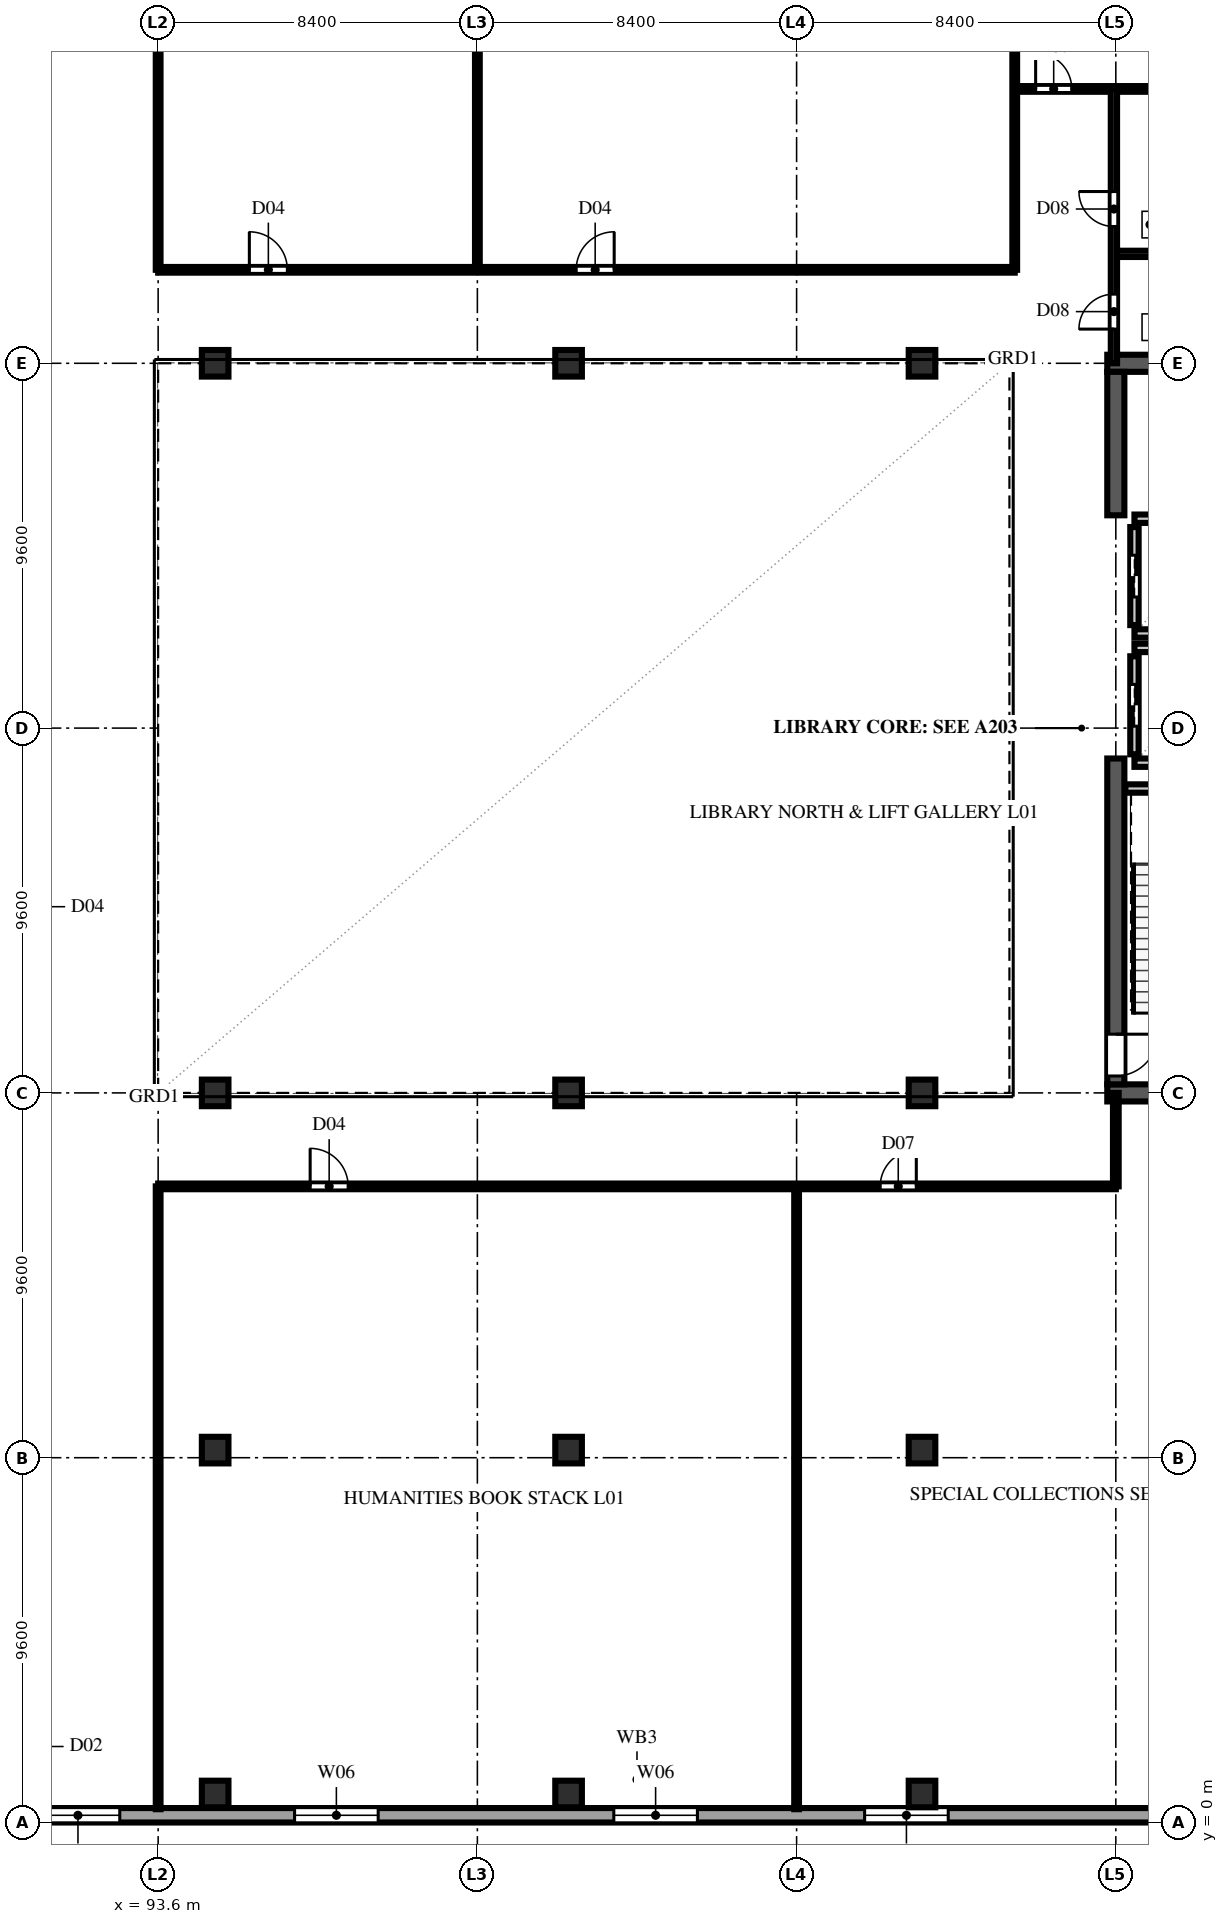
"""IFC4 building model, lengths in metres.
Left out: names, types, materials, properties, quantities, classifications, styles, units other than length and angle.
Written with IfcOpenShell. Run it as: python <this file> out.ifc"""

import sys

from ifc_helpers import new_model, si_unit, direction, frame, frame_2d, origin, origin_2d, place, context, subcontext, project, spatial, rectangle, extrude, element, fill, save


model = new_model("IFC4")
c1 = context("Model", 3, precision=1e-05, world=origin(), true_north=direction((0.0, 1.0)))
c2 = subcontext(c1, "Body", "Model", "MODEL_VIEW")
j1 = project(units=[si_unit("LENGTHUNIT", "METRE"), si_unit("PLANEANGLEUNIT", "RADIAN")], contexts=[c1])
p1 = place(None, origin())
s1 = spatial("IfcSite", under=j1, at=p1, CompositionType="ELEMENT")
p2 = place(p1, origin())
s2 = spatial("IfcBuilding", under=s1, at=p2, CompositionType="ELEMENT")
p3 = place(p2, frame((0.0, 0.0, 5.2)))
s3 = spatial("IfcBuildingStorey", under=s2, at=p3, CompositionType="ELEMENT", Elevation=5.2)
for number, where, z_axis, x_axis in (
    (1, (118.575, 19.2, 0.0), (0.0, 0.0, 1.0), (1.0, 0.0, 0.0)),
    (2, (118.575, 38.4, 0.0), (0.0, 0.0, 1.0), (1.0, 0.0, 0.0)),
):
    element("IfcWall", number, at=place(p3, frame(where, z_axis=z_axis, x_axis=x_axis)), inside=s3, PredefinedType="SHEAR", context=c2, shape_type="SweptSolid", body=[
        extrude(rectangle(XDim=7.2, YDim=0.45, at=frame_2d((3.6, 0.0))), origin(), (0.0, 0.0, 1.0), 4.85),
    ])
p4 = place(p3, frame((118.8, 19.425, 0.0), z_axis=(0.0, 0.0, 1.0), x_axis=(0.0, 1.0, 0.0)))
e3 = element("IfcWall", 3, at=p4, inside=s3, PredefinedType="SHEAR", context=c2, shape_type="SweptSolid", body=[
    extrude(rectangle(XDim=8.575, YDim=0.45, at=frame_2d((4.288, 0.0))), origin(), (0.0, 0.0, 1.0), 4.85),
])
p5 = place(p4, frame((0.22, 0.0, 0.0)))
e4 = element("IfcOpeningElement", 4, at=p5, cuts=e3, PredefinedType="OPENING", context=c2, shape_type="SweptSolid", body=[
    extrude(rectangle(XDim=1.1, YDim=2.2, at=frame_2d((0.55, 1.1))), frame((0.0, 0.237, 0.0), z_axis=(0.0, -1.0, 0.0), x_axis=(1.0, 0.0, 0.0)), (0.0, 0.0, 1.0), 0.474),
])
p6 = place(p3, frame((118.8, 34.4, 0.0), z_axis=(0.0, 0.0, 1.0), x_axis=(0.0, 1.0, 0.0)))
e5 = element("IfcWall", 5, at=p6, inside=s3, PredefinedType="SHEAR", context=c2, shape_type="SweptSolid", body=[
    extrude(rectangle(XDim=3.775, YDim=0.45, at=frame_2d((1.888, 0.0))), origin(), (0.0, 0.0, 1.0), 4.85),
])
for number, where, z_axis, x_axis in (
    (6, (95.1, 0.75, 0.0), (0.0, 0.0, 1.0), (1.0, 0.0, 0.0)),
    (7, (95.1, 9.8, 0.0), (0.0, 0.0, 1.0), (1.0, 0.0, 0.0)),
    (8, (95.1, 19.2, 0.0), (0.0, 0.0, 1.0), (1.0, 0.0, 0.0)),
    (9, (95.1, 38.4, 0.0), (0.0, 0.0, 1.0), (1.0, 0.0, 0.0)),
    (10, (104.4, 0.75, 0.0), (0.0, 0.0, 1.0), (1.0, 0.0, 0.0)),
    (11, (104.4, 9.8, 0.0), (0.0, 0.0, 1.0), (1.0, 0.0, 0.0)),
    (12, (104.4, 19.2, 0.0), (0.0, 0.0, 1.0), (1.0, 0.0, 0.0)),
    (13, (104.4, 38.4, 0.0), (0.0, 0.0, 1.0), (1.0, 0.0, 0.0)),
    (14, (113.7, 0.75, 0.0), (0.0, 0.0, 1.0), (1.0, 0.0, 0.0)),
    (15, (113.7, 9.8, 0.0), (0.0, 0.0, 1.0), (1.0, 0.0, 0.0)),
    (16, (113.7, 19.2, 0.0), (0.0, 0.0, 1.0), (1.0, 0.0, 0.0)),
    (17, (113.7, 38.4, 0.0), (0.0, 0.0, 1.0), (1.0, 0.0, 0.0)),
):
    element("IfcColumn", number, at=place(p3, frame(where, z_axis=z_axis, x_axis=x_axis)), inside=s3, PredefinedType="COLUMN", context=c2, shape_type="SweptSolid", body=[
        extrude(rectangle(XDim=0.7, YDim=0.7, at=origin_2d()), origin(), (0.0, 0.0, 1.0), 5.2),
    ])
p7 = place(p3, frame((85.39, 0.19, 0.0), z_axis=(0.0, 0.0, 1.0), x_axis=(1.0, 0.0, 0.0)))
e18 = element("IfcWall", 18, at=p7, inside=s3, PredefinedType="SOLIDWALL", context=c2, shape_type="SweptSolid", body=[
    extrude(rectangle(XDim=41.62, YDim=0.38, at=frame_2d((20.81, 0.0))), origin(), (0.0, 0.0, 1.0), 4.85),
])
p8 = place(p7, frame((5.0, 0.0, 0.85)))
e19 = element("IfcOpeningElement", 19, at=p8, cuts=e18, PredefinedType="OPENING", context=c2, shape_type="SweptSolid", body=[
    extrude(rectangle(XDim=2.2, YDim=2.25, at=frame_2d((1.1, 1.125))), frame((0.0, 0.202, 0.0), z_axis=(0.0, -1.0, 0.0), x_axis=(1.0, 0.0, 0.0)), (0.0, 0.0, 1.0), 0.404),
])
p9 = place(p7, frame((11.8, 0.0, 0.85)))
e20 = element("IfcOpeningElement", 20, at=p9, cuts=e18, PredefinedType="OPENING", context=c2, shape_type="SweptSolid", body=[
    extrude(rectangle(XDim=2.2, YDim=2.25, at=frame_2d((1.1, 1.125))), frame((0.0, 0.202, 0.0), z_axis=(0.0, -1.0, 0.0), x_axis=(1.0, 0.0, 0.0)), (0.0, 0.0, 1.0), 0.404),
])
p10 = place(p7, frame((20.2, 0.0, 0.85)))
e21 = element("IfcOpeningElement", 21, at=p10, cuts=e18, PredefinedType="OPENING", context=c2, shape_type="SweptSolid", body=[
    extrude(rectangle(XDim=2.2, YDim=2.25, at=frame_2d((1.1, 1.125))), frame((0.0, 0.202, 0.0), z_axis=(0.0, -1.0, 0.0), x_axis=(1.0, 0.0, 0.0)), (0.0, 0.0, 1.0), 0.404),
])
p11 = place(p7, frame((26.8, 0.0, 0.85)))
e22 = element("IfcOpeningElement", 22, at=p11, cuts=e18, PredefinedType="OPENING", context=c2, shape_type="SweptSolid", body=[
    extrude(rectangle(XDim=2.2, YDim=2.25, at=frame_2d((1.1, 1.125))), frame((0.0, 0.202, 0.0), z_axis=(0.0, -1.0, 0.0), x_axis=(1.0, 0.0, 0.0)), (0.0, 0.0, 1.0), 0.404),
])
p12 = place(p7, frame((36.8, 0.0, 0.85)))
e23 = element("IfcOpeningElement", 23, at=p12, cuts=e18, PredefinedType="OPENING", context=c2, shape_type="SweptSolid", body=[
    extrude(rectangle(XDim=2.2, YDim=2.25, at=frame_2d((1.1, 1.125))), frame((0.0, 0.202, 0.0), z_axis=(0.0, -1.0, 0.0), x_axis=(1.0, 0.0, 0.0)), (0.0, 0.0, 1.0), 0.404),
])
p13 = place(p3, frame((119.05, 27.21, 0.0), z_axis=(0.0, 0.0, 1.0), x_axis=(1.0, 0.0, 0.0)))
e24 = element("IfcWall", 24, at=p13, inside=s3, PredefinedType="SOLIDWALL", context=c2, shape_type="SweptSolid", body=[
    extrude(rectangle(XDim=3.75, YDim=0.22, at=frame_2d((1.875, 0.0))), origin(), (0.0, 0.0, 1.0), 4.85),
])
p14 = place(p3, frame((119.29, 28.11, 0.0), z_axis=(0.0, 0.0, 1.0), x_axis=(0.0, 1.0, 0.0)))
e25 = element("IfcWall", 25, at=p14, inside=s3, PredefinedType="SOLIDWALL", context=c2, shape_type="SweptSolid", body=[
    extrude(rectangle(XDim=2.58, YDim=0.22, at=frame_2d((1.29, 0.0))), origin(), (0.0, 0.0, 1.0), 4.85),
])
p15 = place(p14, frame((0.74, 0.0, 0.0)))
e26 = element("IfcOpeningElement", 26, at=p15, cuts=e25, PredefinedType="OPENING", context=c2, shape_type="SweptSolid", body=[
    extrude(rectangle(XDim=1.1, YDim=2.2, at=frame_2d((0.55, 1.1))), frame((0.0, 0.122, 0.0), z_axis=(0.0, -1.0, 0.0), x_axis=(1.0, 0.0, 0.0)), (0.0, 0.0, 1.0), 0.244),
])
for number, where, z_axis, x_axis in (
    (27, (119.29, 27.89, 0.0), (0.0, 0.0, 1.0), (1.0, 0.0, 0.0)),
    (28, (119.29, 30.91, 0.0), (0.0, 0.0, 1.0), (1.0, 0.0, 0.0)),
):
    element("IfcWall", number, at=place(p3, frame(where, z_axis=z_axis, x_axis=x_axis)), inside=s3, PredefinedType="SOLIDWALL", context=c2, shape_type="SweptSolid", body=[
        extrude(rectangle(XDim=2.62, YDim=0.22, at=frame_2d((1.31, 0.0))), origin(), (0.0, 0.0, 1.0), 4.85),
    ])
p16 = place(p3, frame((119.29, 31.51, 0.0), z_axis=(0.0, 0.0, 1.0), x_axis=(0.0, 1.0, 0.0)))
e29 = element("IfcWall", 29, at=p16, inside=s3, PredefinedType="SOLIDWALL", context=c2, shape_type="SweptSolid", body=[
    extrude(rectangle(XDim=2.58, YDim=0.22, at=frame_2d((1.29, 0.0))), origin(), (0.0, 0.0, 1.0), 4.85),
])
p17 = place(p16, frame((0.74, 0.0, 0.0)))
e30 = element("IfcOpeningElement", 30, at=p17, cuts=e29, PredefinedType="OPENING", context=c2, shape_type="SweptSolid", body=[
    extrude(rectangle(XDim=1.1, YDim=2.2, at=frame_2d((0.55, 1.1))), frame((0.0, 0.122, 0.0), z_axis=(0.0, -1.0, 0.0), x_axis=(1.0, 0.0, 0.0)), (0.0, 0.0, 1.0), 0.244),
])
for number, where, z_axis, x_axis in (
    (31, (119.29, 31.29, 0.0), (0.0, 0.0, 1.0), (1.0, 0.0, 0.0)),
    (32, (119.29, 34.31, 0.0), (0.0, 0.0, 1.0), (1.0, 0.0, 0.0)),
):
    element("IfcWall", number, at=place(p3, frame(where, z_axis=z_axis, x_axis=x_axis)), inside=s3, PredefinedType="SOLIDWALL", context=c2, shape_type="SweptSolid", body=[
        extrude(rectangle(XDim=2.62, YDim=0.22, at=frame_2d((1.31, 0.0))), origin(), (0.0, 0.0, 1.0), 4.85),
    ])
for number, where, z_axis, x_axis in (
    (33, (93.6, 0.35, 0.0), (0.0, 0.0, 1.0), (0.0, 1.0, 0.0)),
    (34, (110.4, 0.35, 0.0), (0.0, 0.0, 1.0), (0.0, 1.0, 0.0)),
):
    element("IfcWall", number, at=place(p3, frame(where, z_axis=z_axis, x_axis=x_axis)), inside=s3, PredefinedType="PARTITIONING", context=c2, shape_type="SweptSolid", body=[
        extrude(rectangle(XDim=16.39, YDim=0.125, at=frame_2d((8.195, 0.0))), origin(), (0.0, 0.0, 1.0), 4.85),
    ])
p18 = place(p3, frame((118.8, 16.74, 0.0), z_axis=(0.0, 0.0, 1.0), x_axis=(0.0, 1.0, 0.0)))
e35 = element("IfcWall", 35, at=p18, inside=s3, PredefinedType="PARTITIONING", context=c2, shape_type="SweptSolid", body=[
    extrude(rectangle(XDim=2.46, YDim=0.15, at=frame_2d((1.23, 0.0))), origin(), (0.0, 0.0, 1.0), 4.85),
])
p19 = place(p3, frame((93.6, 16.74, 0.0), z_axis=(0.0, 0.0, 1.0), x_axis=(1.0, 0.0, 0.0)))
e36 = element("IfcWall", 36, at=p19, inside=s3, PredefinedType="PARTITIONING", context=c2, shape_type="SweptSolid", body=[
    extrude(rectangle(XDim=25.2, YDim=0.15, at=frame_2d((12.6, 0.0))), origin(), (0.0, 0.0, 1.0), 4.85),
])
p20 = place(p19, frame((4.0, 0.0, 0.0)))
e37 = element("IfcOpeningElement", 37, at=p20, cuts=e36, PredefinedType="OPENING", context=c2, shape_type="SweptSolid", body=[
    extrude(rectangle(XDim=1.0, YDim=2.2, at=frame_2d((0.5, 1.1))), frame((0.0, 0.087, 0.0), z_axis=(0.0, -1.0, 0.0), x_axis=(1.0, 0.0, 0.0)), (0.0, 0.0, 1.0), 0.174),
])
p21 = place(p19, frame((19.0, 0.0, 0.0)))
e38 = element("IfcOpeningElement", 38, at=p21, cuts=e36, PredefinedType="OPENING", context=c2, shape_type="SweptSolid", body=[
    extrude(rectangle(XDim=0.95, YDim=2.15, at=frame_2d((0.475, 1.075))), frame((0.0, 0.087, 0.0), z_axis=(0.0, -1.0, 0.0), x_axis=(1.0, 0.0, 0.0)), (0.0, 0.0, 1.0), 0.174),
])
for number, where, z_axis, x_axis in (
    (39, (93.6, 40.86, 0.0), (0.0, 0.0, 1.0), (0.0, 1.0, 0.0)),
    (40, (102.0, 40.86, 0.0), (0.0, 0.0, 1.0), (0.0, 1.0, 0.0)),
    (41, (116.14, 40.86, 0.0), (0.0, 0.0, 1.0), (0.0, 1.0, 0.0)),
):
    element("IfcWall", number, at=place(p3, frame(where, z_axis=z_axis, x_axis=x_axis)), inside=s3, PredefinedType="PARTITIONING", context=c2, shape_type="SweptSolid", body=[
        extrude(rectangle(XDim=16.39, YDim=0.125, at=frame_2d((8.195, 0.0))), origin(), (0.0, 0.0, 1.0), 4.85),
    ])
p22 = place(p3, frame((93.6, 40.86, 0.0), z_axis=(0.0, 0.0, 1.0), x_axis=(1.0, 0.0, 0.0)))
e42 = element("IfcWall", 42, at=p22, inside=s3, PredefinedType="PARTITIONING", context=c2, shape_type="SweptSolid", body=[
    extrude(rectangle(XDim=22.54, YDim=0.15, at=frame_2d((11.27, 0.0))), origin(), (0.0, 0.0, 1.0), 4.85),
])
p23 = place(p22, frame((2.4, 0.0, 0.0)))
e43 = element("IfcOpeningElement", 43, at=p23, cuts=e42, PredefinedType="OPENING", context=c2, shape_type="SweptSolid", body=[
    extrude(rectangle(XDim=1.0, YDim=2.2, at=frame_2d((0.5, 1.1))), frame((0.0, 0.087, 0.0), z_axis=(0.0, -1.0, 0.0), x_axis=(1.0, 0.0, 0.0)), (0.0, 0.0, 1.0), 0.174),
])
p24 = place(p22, frame((11.0, 0.0, 0.0)))
e44 = element("IfcOpeningElement", 44, at=p24, cuts=e42, PredefinedType="OPENING", context=c2, shape_type="SweptSolid", body=[
    extrude(rectangle(XDim=1.0, YDim=2.2, at=frame_2d((0.5, 1.1))), frame((0.0, 0.087, 0.0), z_axis=(0.0, -1.0, 0.0), x_axis=(1.0, 0.0, 0.0)), (0.0, 0.0, 1.0), 0.174),
])
p25 = place(p3, frame((118.75, 41.28, 0.0), z_axis=(0.0, 0.0, 1.0), x_axis=(1.0, 0.0, 0.0)))
e45 = element("IfcWall", 45, at=p25, inside=s3, PredefinedType="PLUMBINGWALL", context=c2, shape_type="SweptSolid", body=[
    extrude(rectangle(XDim=8.1, YDim=0.165, at=frame_2d((4.05, 0.0))), origin(), (0.0, 0.0, 1.0), 4.85),
])
p26 = place(p3, frame((116.14, 45.62, 0.0), z_axis=(0.0, 0.0, 1.0), x_axis=(1.0, 0.0, 0.0)))
e46 = element("IfcWall", 46, at=p26, inside=s3, PredefinedType="PARTITIONING", context=c2, shape_type="SweptSolid", body=[
    extrude(rectangle(XDim=10.71, YDim=0.15, at=frame_2d((5.355, 0.0))), origin(), (0.0, 0.0, 1.0), 4.85),
])
p27 = place(p26, frame((0.55, 0.0, 0.0)))
e47 = element("IfcOpeningElement", 47, at=p27, cuts=e46, PredefinedType="OPENING", context=c2, shape_type="SweptSolid", body=[
    extrude(rectangle(XDim=0.95, YDim=2.15, at=frame_2d((0.475, 1.075))), frame((0.0, 0.087, 0.0), z_axis=(0.0, -1.0, 0.0), x_axis=(1.0, 0.0, 0.0)), (0.0, 0.0, 1.0), 0.174),
])
p28 = place(p3, frame((118.75, 38.4, 0.0), z_axis=(0.0, 0.0, 1.0), x_axis=(0.0, 1.0, 0.0)))
e48 = element("IfcWall", 48, at=p28, inside=s3, PredefinedType="PLUMBINGWALL", context=c2, shape_type="SweptSolid", body=[
    extrude(rectangle(XDim=7.22, YDim=0.165, at=frame_2d((3.61, 0.0))), origin(), (0.0, 0.0, 1.0), 4.85),
])
p29 = place(p28, frame((0.9, 0.0, 0.0)))
e49 = element("IfcOpeningElement", 49, at=p29, cuts=e48, PredefinedType="OPENING", context=c2, shape_type="SweptSolid", body=[
    extrude(rectangle(XDim=0.92, YDim=2.15, at=frame_2d((0.46, 1.075))), frame((0.0, 0.094, 0.0), z_axis=(0.0, -1.0, 0.0), x_axis=(1.0, 0.0, 0.0)), (0.0, 0.0, 1.0), 0.189),
])
p30 = place(p28, frame((3.6, 0.0, 0.0)))
e50 = element("IfcOpeningElement", 50, at=p30, cuts=e48, PredefinedType="OPENING", context=c2, shape_type="SweptSolid", body=[
    extrude(rectangle(XDim=0.92, YDim=2.15, at=frame_2d((0.46, 1.075))), frame((0.0, 0.094, 0.0), z_axis=(0.0, -1.0, 0.0), x_axis=(1.0, 0.0, 0.0)), (0.0, 0.0, 1.0), 0.189),
])
p31 = place(p8, origin())
e51 = element("IfcWindow", 51, at=p31, inside=s3, PartitioningType="DOUBLE_PANEL_VERTICAL", PredefinedType="WINDOW", context=c2, shape_type="SweptSolid", body=[
    extrude(rectangle(XDim=2.2, YDim=2.25, at=frame_2d((1.1, 1.125))), frame((0.0, 0.11, 0.0), z_axis=(0.0, -1.0, 0.0), x_axis=(1.0, 0.0, 0.0)), (0.0, 0.0, 1.0), 0.06),
])
fill(e19, e51)
p32 = place(p9, origin())
e52 = element("IfcWindow", 52, at=p32, inside=s3, PartitioningType="DOUBLE_PANEL_VERTICAL", PredefinedType="WINDOW", context=c2, shape_type="SweptSolid", body=[
    extrude(rectangle(XDim=2.2, YDim=2.25, at=frame_2d((1.1, 1.125))), frame((0.0, 0.11, 0.0), z_axis=(0.0, -1.0, 0.0), x_axis=(1.0, 0.0, 0.0)), (0.0, 0.0, 1.0), 0.06),
])
fill(e20, e52)
p33 = place(p10, origin())
e53 = element("IfcWindow", 53, at=p33, inside=s3, PartitioningType="DOUBLE_PANEL_VERTICAL", PredefinedType="WINDOW", context=c2, shape_type="SweptSolid", body=[
    extrude(rectangle(XDim=2.2, YDim=2.25, at=frame_2d((1.1, 1.125))), frame((0.0, 0.11, 0.0), z_axis=(0.0, -1.0, 0.0), x_axis=(1.0, 0.0, 0.0)), (0.0, 0.0, 1.0), 0.06),
])
fill(e21, e53)
p34 = place(p11, origin())
e54 = element("IfcWindow", 54, at=p34, inside=s3, PartitioningType="DOUBLE_PANEL_VERTICAL", PredefinedType="WINDOW", context=c2, shape_type="SweptSolid", body=[
    extrude(rectangle(XDim=2.2, YDim=2.25, at=frame_2d((1.1, 1.125))), frame((0.0, 0.11, 0.0), z_axis=(0.0, -1.0, 0.0), x_axis=(1.0, 0.0, 0.0)), (0.0, 0.0, 1.0), 0.06),
])
fill(e22, e54)
p35 = place(p5, frame((1.1, 0.0, 0.0), z_axis=(0.0, 0.0, 1.0), x_axis=(-1.0, 0.0, 0.0)))
e55 = element("IfcDoor", 55, at=p35, inside=s3, OperationType="SINGLE_SWING_LEFT", PredefinedType="DOOR", context=c2, shape_type="SweptSolid", body=[
    extrude(rectangle(XDim=1.1, YDim=2.2, at=frame_2d((0.55, 1.1))), frame((0.0, 0.025, 0.0), z_axis=(0.0, -1.0, 0.0), x_axis=(1.0, 0.0, 0.0)), (0.0, 0.0, 1.0), 0.05),
])
fill(e4, e55)
p36 = place(p15, origin())
e56 = element("IfcDoor", 56, at=p36, inside=s3, OperationType="DOUBLE_DOOR_SLIDING", PredefinedType="DOOR", context=c2, shape_type="SweptSolid", body=[
    extrude(rectangle(XDim=1.1, YDim=2.2, at=frame_2d((0.55, 1.1))), frame((0.0, 0.025, 0.0), z_axis=(0.0, -1.0, 0.0), x_axis=(1.0, 0.0, 0.0)), (0.0, 0.0, 1.0), 0.05),
])
fill(e26, e56)
p37 = place(p17, origin())
e57 = element("IfcDoor", 57, at=p37, inside=s3, OperationType="DOUBLE_DOOR_SLIDING", PredefinedType="DOOR", context=c2, shape_type="SweptSolid", body=[
    extrude(rectangle(XDim=1.1, YDim=2.2, at=frame_2d((0.55, 1.1))), frame((0.0, 0.025, 0.0), z_axis=(0.0, -1.0, 0.0), x_axis=(1.0, 0.0, 0.0)), (0.0, 0.0, 1.0), 0.05),
])
fill(e30, e57)
p38 = place(p20, origin())
e58 = element("IfcDoor", 58, at=p38, inside=s3, OperationType="SINGLE_SWING_LEFT", PredefinedType="DOOR", context=c2, shape_type="SweptSolid", body=[
    extrude(rectangle(XDim=1.0, YDim=2.2, at=frame_2d((0.5, 1.1))), frame((0.0, 0.025, 0.0), z_axis=(0.0, -1.0, 0.0), x_axis=(1.0, 0.0, 0.0)), (0.0, 0.0, 1.0), 0.05),
])
fill(e37, e58)
p39 = place(p21, origin())
e59 = element("IfcDoor", 59, at=p39, inside=s3, OperationType="SINGLE_SWING_RIGHT", PredefinedType="DOOR", context=c2, shape_type="SweptSolid", body=[
    extrude(rectangle(XDim=0.95, YDim=2.15, at=frame_2d((0.475, 1.075))), frame((0.0, 0.025, 0.0), z_axis=(0.0, -1.0, 0.0), x_axis=(1.0, 0.0, 0.0)), (0.0, 0.0, 1.0), 0.05),
])
fill(e38, e59)
p40 = place(p23, origin())
e60 = element("IfcDoor", 60, at=p40, inside=s3, OperationType="SINGLE_SWING_LEFT", PredefinedType="DOOR", context=c2, shape_type="SweptSolid", body=[
    extrude(rectangle(XDim=1.0, YDim=2.2, at=frame_2d((0.5, 1.1))), frame((0.0, 0.025, 0.0), z_axis=(0.0, -1.0, 0.0), x_axis=(1.0, 0.0, 0.0)), (0.0, 0.0, 1.0), 0.05),
])
fill(e43, e60)
p41 = place(p24, origin())
e61 = element("IfcDoor", 61, at=p41, inside=s3, OperationType="SINGLE_SWING_RIGHT", PredefinedType="DOOR", context=c2, shape_type="SweptSolid", body=[
    extrude(rectangle(XDim=1.0, YDim=2.2, at=frame_2d((0.5, 1.1))), frame((0.0, 0.025, 0.0), z_axis=(0.0, -1.0, 0.0), x_axis=(1.0, 0.0, 0.0)), (0.0, 0.0, 1.0), 0.05),
])
fill(e44, e61)
p42 = place(p27, origin())
e62 = element("IfcDoor", 62, at=p42, inside=s3, OperationType="SINGLE_SWING_LEFT", PredefinedType="DOOR", context=c2, shape_type="SweptSolid", body=[
    extrude(rectangle(XDim=0.95, YDim=2.15, at=frame_2d((0.475, 1.075))), frame((0.0, 0.025, 0.0), z_axis=(0.0, -1.0, 0.0), x_axis=(1.0, 0.0, 0.0)), (0.0, 0.0, 1.0), 0.05),
])
fill(e47, e62)
p43 = place(p29, origin())
e63 = element("IfcDoor", 63, at=p43, inside=s3, OperationType="SINGLE_SWING_LEFT", PredefinedType="DOOR", context=c2, shape_type="SweptSolid", body=[
    extrude(rectangle(XDim=0.92, YDim=2.15, at=frame_2d((0.46, 1.075))), frame((0.0, 0.025, 0.0), z_axis=(0.0, -1.0, 0.0), x_axis=(1.0, 0.0, 0.0)), (0.0, 0.0, 1.0), 0.05),
])
fill(e49, e63)
p44 = place(p30, origin())
e64 = element("IfcDoor", 64, at=p44, inside=s3, OperationType="SINGLE_SWING_RIGHT", PredefinedType="DOOR", context=c2, shape_type="SweptSolid", body=[
    extrude(rectangle(XDim=0.92, YDim=2.15, at=frame_2d((0.46, 1.075))), frame((0.0, 0.025, 0.0), z_axis=(0.0, -1.0, 0.0), x_axis=(1.0, 0.0, 0.0)), (0.0, 0.0, 1.0), 0.05),
])
fill(e50, e64)
save(model, sys.argv[1])
